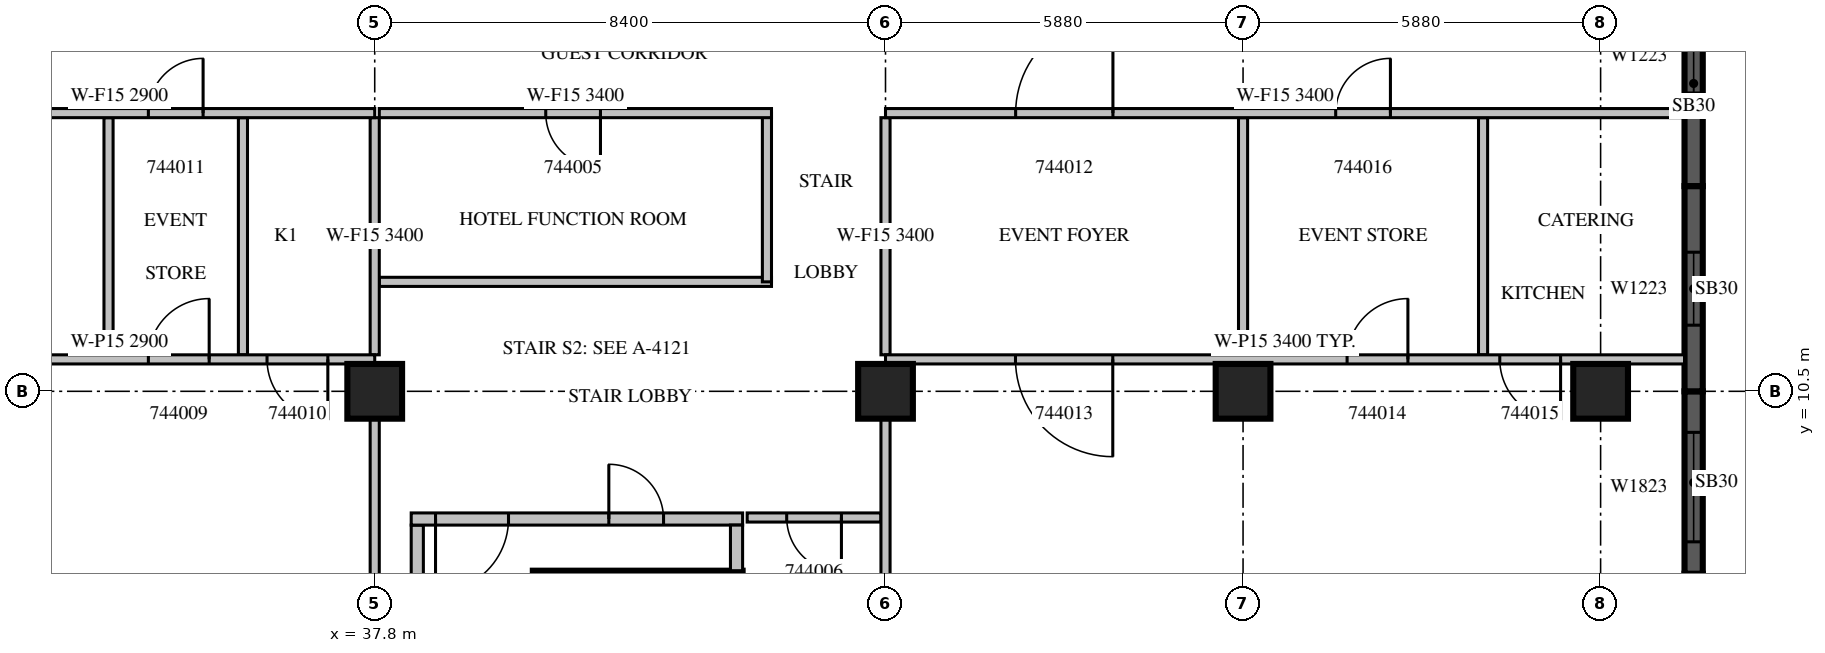
"""IFC4 building model, lengths in metres.
Left out: names, types, materials, properties, quantities, classifications, styles, units other than length and angle.
Written with IfcOpenShell. Run it as: python <this file> out.ifc"""

import sys

from ifc_helpers import new_model, si_unit, direction, frame, frame_2d, origin, origin_2d, place, context, subcontext, project, spatial, rectangle, extrude, source, transform, mapped, element, fill, save


model = new_model("IFC4")
c1 = context("Model", 3, precision=1e-05, world=origin(), true_north=direction((0.0, 1.0)))
c2 = subcontext(c1, "Body", "Model", "MODEL_VIEW")
j1 = project(units=[si_unit("LENGTHUNIT", "METRE"), si_unit("PLANEANGLEUNIT", "RADIAN")], contexts=[c1])
p1 = place(None, origin())
s1 = spatial("IfcSite", under=j1, at=p1, CompositionType="ELEMENT")
p2 = place(p1, origin())
s2 = spatial("IfcBuilding", under=s1, at=p2, CompositionType="ELEMENT")
p3 = place(p2, frame((0.0, 0.0, 200.6)))
s3 = spatial("IfcBuildingStorey", under=s2, at=p3, CompositionType="ELEMENT", Elevation=200.6)
m1 = source(origin(), c2, "Body", "SweptSolid", [
    extrude(rectangle(XDim=0.9, YDim=0.9, at=origin_2d()), origin(), (0.0, 0.0, 1.0), 3.8),
])
for number, where, z_axis, x_axis in (
    (1, (37.8, 10.5, 0.0), (0.0, 0.0, 1.0), (1.0, 0.0, 0.0)),
    (2, (46.2, 10.5, 0.0), (0.0, 0.0, 1.0), (1.0, 0.0, 0.0)),
    (3, (52.08, 10.5, 0.0), (0.0, 0.0, 1.0), (1.0, 0.0, 0.0)),
    (4, (57.96, 10.5, 0.0), (0.0, 0.0, 1.0), (1.0, 0.0, 0.0)),
):
    element("IfcColumn", number, at=place(p3, frame(where, z_axis=z_axis, x_axis=x_axis)), inside=s3, PredefinedType="COLUMN", context=c2, shape_type="MappedRepresentation", body=[
        mapped(m1, transform((0.0, 0.0, 0.0), scale=1.0)),
    ])
p4 = place(p3, frame((59.49, 7.5, 0.0), z_axis=(0.0, 0.0, 1.0), x_axis=(0.0, 1.0, 0.0)))
e5 = element("IfcWall", 5, at=p4, inside=s3, PredefinedType="SOLIDWALL", context=c2, shape_type="SweptSolid", body=[
    extrude(rectangle(XDim=3.0, YDim=0.3, at=frame_2d((1.5, 0.0))), origin(), (0.0, 0.0, 1.0), 3.4),
])
m2 = source(origin(), c2, "Body", "SweptSolid", [
    extrude(rectangle(XDim=1.8, YDim=2.3, at=frame_2d((0.9, 1.15))), frame((0.0, 0.16, 0.0), z_axis=(0.0, -1.0, 0.0), x_axis=(1.0, 0.0, 0.0)), (0.0, 0.0, 1.0), 0.32),
])
p5 = place(p4, frame((0.525, 0.0, 0.6)))
e6 = element("IfcOpeningElement", 6, at=p5, cuts=e5, PredefinedType="OPENING", context=c2, shape_type="MappedRepresentation", body=[
    mapped(m2, transform((0.0, 0.0, 0.0), scale=1.0)),
])
p6 = place(p3, frame((59.49, 10.5, 0.0), z_axis=(0.0, 0.0, 1.0), x_axis=(0.0, 1.0, 0.0)))
e7 = element("IfcWall", 7, at=p6, inside=s3, PredefinedType="SOLIDWALL", context=c2, shape_type="SweptSolid", body=[
    extrude(rectangle(XDim=3.375, YDim=0.3, at=frame_2d((1.688, 0.0))), origin(), (0.0, 0.0, 1.0), 3.4),
])
m3 = source(origin(), c2, "Body", "SweptSolid", [
    extrude(rectangle(XDim=1.2, YDim=2.3, at=frame_2d((0.6, 1.15))), frame((0.0, 0.16, 0.0), z_axis=(0.0, -1.0, 0.0), x_axis=(1.0, 0.0, 0.0)), (0.0, 0.0, 1.0), 0.32),
])
p7 = place(p6, frame((1.087, 0.0, 0.6)))
e8 = element("IfcOpeningElement", 8, at=p7, cuts=e7, PredefinedType="OPENING", context=c2, shape_type="MappedRepresentation", body=[
    mapped(m3, transform((0.0, 0.0, 0.0), scale=1.0)),
])
m4 = source(origin(), c2, "Body", "SweptSolid", [
    extrude(rectangle(XDim=3.375, YDim=0.3, at=frame_2d((1.688, 0.0))), origin(), (0.0, 0.0, 1.0), 3.4),
])
p8 = place(p3, frame((59.49, 13.875, 0.0), z_axis=(0.0, 0.0, 1.0), x_axis=(0.0, 1.0, 0.0)))
e9 = element("IfcWall", 9, at=p8, inside=s3, PredefinedType="SOLIDWALL", context=c2, shape_type="MappedRepresentation", body=[
    mapped(m4, transform((0.0, 0.0, 0.0), scale=1.0)),
])
p9 = place(p8, frame((1.531, 0.0, 0.6)))
e10 = element("IfcOpeningElement", 10, at=p9, cuts=e9, PredefinedType="OPENING", context=c2, shape_type="MappedRepresentation", body=[
    mapped(m3, transform((0.0, 0.0, 0.0), scale=1.0)),
])
m5 = source(origin(), c2, "Body", "SweptSolid", [
    extrude(rectangle(XDim=3.45, YDim=0.25, at=frame_2d((1.725, 0.0))), origin(), (0.0, 0.0, 1.0), 3.4),
])
p10 = place(p3, frame((40.4, 7.425, 0.0), z_axis=(0.0, 0.0, 1.0), x_axis=(1.0, 0.0, 0.0)))
e11 = element("IfcWall", 11, at=p10, inside=s3, PredefinedType="SOLIDWALL", context=c2, shape_type="MappedRepresentation", body=[
    mapped(m5, transform((0.0, 0.0, 0.0), scale=1.0)),
])
m6 = source(origin(), c2, "Body", "SweptSolid", [
    extrude(rectangle(XDim=8.0, YDim=0.2, at=frame_2d((4.0, 0.0))), origin(), (0.0, 0.0, 1.0), 3.4),
])
p11 = place(p3, frame((38.5, 0.3, 0.0), z_axis=(0.0, 0.0, 1.0), x_axis=(0.0, 1.0, 0.0)))
e12 = element("IfcWall", 12, at=p11, inside=s3, PredefinedType="PARTITIONING", context=c2, shape_type="MappedRepresentation", body=[
    mapped(m6, transform((0.0, 0.0, 0.0), scale=1.0)),
])
m7 = source(origin(), c2, "Body", "SweptSolid", [
    extrude(rectangle(XDim=5.45, YDim=0.2, at=frame_2d((2.725, 0.0))), origin(), (0.0, 0.0, 1.0), 3.4),
])
p12 = place(p3, frame((38.4, 8.4, 0.0), z_axis=(0.0, 0.0, 1.0), x_axis=(1.0, 0.0, 0.0)))
e13 = element("IfcWall", 13, at=p12, inside=s3, PredefinedType="PARTITIONING", context=c2, shape_type="MappedRepresentation", body=[
    mapped(m7, transform((0.0, 0.0, 0.0), scale=1.0)),
])
m8 = source(origin(), c2, "Body", "SweptSolid", [
    extrude(rectangle(XDim=1.2, YDim=2.1, at=frame_2d((0.6, 1.05))), frame((0.0, 0.11, 0.0), z_axis=(0.0, -1.0, 0.0), x_axis=(1.0, 0.0, 0.0)), (0.0, 0.0, 1.0), 0.22),
])
p13 = place(p12, frame((0.4, 0.0, 0.0)))
e14 = element("IfcOpeningElement", 14, at=p13, cuts=e13, PredefinedType="OPENING", context=c2, shape_type="MappedRepresentation", body=[
    mapped(m8, transform((0.0, 0.0, 0.0), scale=1.0)),
])
m9 = source(origin(), c2, "Body", "SweptSolid", [
    extrude(rectangle(XDim=0.9, YDim=2.1, at=frame_2d((0.45, 1.05))), frame((0.0, 0.11, 0.0), z_axis=(0.0, -1.0, 0.0), x_axis=(1.0, 0.0, 0.0)), (0.0, 0.0, 1.0), 0.22),
])
p14 = place(p12, frame((3.25, 0.0, 0.0)))
e15 = element("IfcOpeningElement", 15, at=p14, cuts=e13, PredefinedType="OPENING", context=c2, shape_type="MappedRepresentation", body=[
    mapped(m9, transform((0.0, 0.0, 0.0), scale=1.0)),
])
m10 = source(origin(), c2, "Body", "SweptSolid", [
    extrude(rectangle(XDim=0.75, YDim=0.2, at=frame_2d((0.375, 0.0))), origin(), (0.0, 0.0, 1.0), 3.4),
])
p15 = place(p3, frame((43.75, 7.55, 0.0), z_axis=(0.0, 0.0, 1.0), x_axis=(0.0, 1.0, 0.0)))
e16 = element("IfcWall", 16, at=p15, inside=s3, PredefinedType="PARTITIONING", context=c2, shape_type="MappedRepresentation", body=[
    mapped(m10, transform((0.0, 0.0, 0.0), scale=1.0)),
])
m11 = source(origin(), c2, "Body", "SweptSolid", [
    extrude(rectangle(XDim=6.45, YDim=0.15, at=frame_2d((3.225, 0.0))), origin(), (0.0, 0.0, 1.0), 3.4),
])
p16 = place(p3, frame((37.875, 12.3, 0.0), z_axis=(0.0, 0.0, 1.0), x_axis=(1.0, 0.0, 0.0)))
e17 = element("IfcWall", 17, at=p16, inside=s3, PredefinedType="PARTITIONING", context=c2, shape_type="MappedRepresentation", body=[
    mapped(m11, transform((0.0, 0.0, 0.0), scale=1.0)),
])
p17 = place(p3, frame((44.25, 12.3, 0.0), z_axis=(0.0, 0.0, 1.0), x_axis=(0.0, 1.0, 0.0)))
e18 = element("IfcWall", 18, at=p17, inside=s3, PredefinedType="PARTITIONING", context=c2, shape_type="SweptSolid", body=[
    extrude(rectangle(XDim=2.775, YDim=0.15, at=frame_2d((1.387, 0.0))), origin(), (0.0, 0.0, 1.0), 3.4),
])
p18 = place(p3, frame((44.325, 15.075, 0.0), z_axis=(0.0, 0.0, 1.0), x_axis=(-1.0, 0.0, 0.0)))
e19 = element("IfcWall", 19, at=p18, inside=s3, PredefinedType="PARTITIONING", context=c2, shape_type="MappedRepresentation", body=[
    mapped(m11, transform((0.0, 0.0, 0.0), scale=1.0)),
])
m12 = source(origin(), c2, "Body", "SweptSolid", [
    extrude(rectangle(XDim=0.9, YDim=2.1, at=frame_2d((0.45, 1.05))), frame((0.0, 0.085, 0.0), z_axis=(0.0, -1.0, 0.0), x_axis=(1.0, 0.0, 0.0)), (0.0, 0.0, 1.0), 0.17),
])
p19 = place(p18, frame((2.812, 0.0, 0.0)))
e20 = element("IfcOpeningElement", 20, at=p19, cuts=e19, PredefinedType="OPENING", context=c2, shape_type="MappedRepresentation", body=[
    mapped(m12, transform((0.0, 0.0, 0.0), scale=1.0)),
])
m13 = source(origin(), c2, "Body", "SweptSolid", [
    extrude(rectangle(XDim=2.2, YDim=0.15, at=frame_2d((1.1, 0.0))), origin(), (0.0, 0.0, 1.0), 3.4),
])
p20 = place(p3, frame((46.125, 8.425, 0.0), z_axis=(0.0, 0.0, 1.0), x_axis=(-1.0, 0.0, 0.0)))
e21 = element("IfcWall", 21, at=p20, inside=s3, PredefinedType="PARTITIONING", context=c2, shape_type="MappedRepresentation", body=[
    mapped(m13, transform((0.0, 0.0, 0.0), scale=1.0)),
])
p21 = place(p20, frame((0.65, 0.0, 0.0)))
e22 = element("IfcOpeningElement", 22, at=p21, cuts=e21, PredefinedType="OPENING", context=c2, shape_type="MappedRepresentation", body=[
    mapped(m12, transform((0.0, 0.0, 0.0), scale=1.0)),
])
m14 = source(origin(), c2, "Body", "SweptSolid", [
    extrude(rectangle(XDim=3.9, YDim=0.15, at=frame_2d((1.95, 0.0))), origin(), (0.0, 0.0, 1.0), 3.4),
])
for number, where, z_axis, x_axis in (
    (23, (33.422, 11.1, 0.0), (0.0, 0.0, 1.0), (0.0, 1.0, 0.0)),
    (24, (35.633, 11.1, 0.0), (0.0, 0.0, 1.0), (0.0, 1.0, 0.0)),
):
    element("IfcWall", number, at=place(p3, frame(where, z_axis=z_axis, x_axis=x_axis)), inside=s3, PredefinedType="PARTITIONING", context=c2, shape_type="MappedRepresentation", body=[
        mapped(m14, transform((0.0, 0.0, 0.0), scale=1.0)),
    ])
m15 = source(origin(), c2, "Body", "SweptSolid", [
    extrude(rectangle(XDim=9.152, YDim=0.15, at=frame_2d((4.576, 0.0))), origin(), (0.0, 0.0, 1.0), 3.4),
])
p22 = place(p3, frame((37.8, 0.899, 0.0), z_axis=(0.0, 0.0, 1.0), x_axis=(0.0, 1.0, 0.0)))
e25 = element("IfcWall", 25, at=p22, inside=s3, PredefinedType="PARTITIONING", context=c2, shape_type="MappedRepresentation", body=[
    mapped(m15, transform((0.0, 0.0, 0.0), scale=1.0)),
])
p23 = place(p3, frame((37.8, 11.1, 0.0), z_axis=(0.0, 0.0, 1.0), x_axis=(0.0, 1.0, 0.0)))
e26 = element("IfcWall", 26, at=p23, inside=s3, PredefinedType="PARTITIONING", context=c2, shape_type="MappedRepresentation", body=[
    mapped(m14, transform((0.0, 0.0, 0.0), scale=1.0)),
])
m16 = source(origin(), c2, "Body", "SweptSolid", [
    extrude(rectangle(XDim=8.4, YDim=0.15, at=frame_2d((4.2, 0.0))), origin(), (0.0, 0.0, 1.0), 2.9),
])
p24 = place(p3, frame((37.8, 11.025, 0.0), z_axis=(0.0, 0.0, 1.0), x_axis=(-1.0, 0.0, 0.0)))
e27 = element("IfcWall", 27, at=p24, inside=s3, PredefinedType="PARTITIONING", context=c2, shape_type="MappedRepresentation", body=[
    mapped(m16, transform((0.0, 0.0, 0.0), scale=1.0)),
])
m17 = source(origin(), c2, "Body", "SweptSolid", [
    extrude(rectangle(XDim=1.6, YDim=2.1, at=frame_2d((0.8, 1.05))), frame((0.0, 0.085, 0.0), z_axis=(0.0, -1.0, 0.0), x_axis=(1.0, 0.0, 0.0)), (0.0, 0.0, 1.0), 0.17),
])
p25 = place(p24, frame((5.351, 0.0, 0.0)))
e28 = element("IfcOpeningElement", 28, at=p25, cuts=e27, PredefinedType="OPENING", context=c2, shape_type="MappedRepresentation", body=[
    mapped(m17, transform((0.0, 0.0, 0.0), scale=1.0)),
])
m18 = source(origin(), c2, "Body", "SweptSolid", [
    extrude(rectangle(XDim=1.0, YDim=2.1, at=frame_2d((0.5, 1.05))), frame((0.0, 0.085, 0.0), z_axis=(0.0, -1.0, 0.0), x_axis=(1.0, 0.0, 0.0)), (0.0, 0.0, 1.0), 0.17),
])
p26 = place(p24, frame((2.722, 0.0, 0.0)))
e29 = element("IfcOpeningElement", 29, at=p26, cuts=e27, PredefinedType="OPENING", context=c2, shape_type="MappedRepresentation", body=[
    mapped(m18, transform((0.0, 0.0, 0.0), scale=1.0)),
])
p27 = place(p24, frame((0.771, 0.0, 0.0)))
e30 = element("IfcOpeningElement", 30, at=p27, cuts=e27, PredefinedType="OPENING", context=c2, shape_type="MappedRepresentation", body=[
    mapped(m18, transform((0.0, 0.0, 0.0), scale=1.0)),
])
for number, where, z_axis, x_axis in (
    (31, (52.08, 11.1, 0.0), (0.0, 0.0, 1.0), (0.0, 1.0, 0.0)),
    (32, (56.027, 11.1, 0.0), (0.0, 0.0, 1.0), (0.0, 1.0, 0.0)),
):
    element("IfcWall", number, at=place(p3, frame(where, z_axis=z_axis, x_axis=x_axis)), inside=s3, PredefinedType="PARTITIONING", context=c2, shape_type="MappedRepresentation", body=[
        mapped(m14, transform((0.0, 0.0, 0.0), scale=1.0)),
    ])
p28 = place(p3, frame((46.2, 0.899, 0.0), z_axis=(0.0, 0.0, 1.0), x_axis=(0.0, 1.0, 0.0)))
e33 = element("IfcWall", 33, at=p28, inside=s3, PredefinedType="PARTITIONING", context=c2, shape_type="MappedRepresentation", body=[
    mapped(m15, transform((0.0, 0.0, 0.0), scale=1.0)),
])
p29 = place(p3, frame((46.2, 11.1, 0.0), z_axis=(0.0, 0.0, 1.0), x_axis=(0.0, 1.0, 0.0)))
e34 = element("IfcWall", 34, at=p29, inside=s3, PredefinedType="PARTITIONING", context=c2, shape_type="MappedRepresentation", body=[
    mapped(m14, transform((0.0, 0.0, 0.0), scale=1.0)),
])
m19 = source(origin(), c2, "Body", "SweptSolid", [
    extrude(rectangle(XDim=13.14, YDim=0.15, at=frame_2d((6.57, 0.0))), origin(), (0.0, 0.0, 1.0), 3.4),
])
p30 = place(p3, frame((59.34, 11.025, 0.0), z_axis=(0.0, 0.0, 1.0), x_axis=(-1.0, 0.0, 0.0)))
e35 = element("IfcWall", 35, at=p30, inside=s3, PredefinedType="PARTITIONING", context=c2, shape_type="MappedRepresentation", body=[
    mapped(m19, transform((0.0, 0.0, 0.0), scale=1.0)),
])
p31 = place(p30, frame((9.402, 0.0, 0.0)))
e36 = element("IfcOpeningElement", 36, at=p31, cuts=e35, PredefinedType="OPENING", context=c2, shape_type="MappedRepresentation", body=[
    mapped(m17, transform((0.0, 0.0, 0.0), scale=1.0)),
])
p32 = place(p30, frame((4.549, 0.0, 0.0)))
e37 = element("IfcOpeningElement", 37, at=p32, cuts=e35, PredefinedType="OPENING", context=c2, shape_type="MappedRepresentation", body=[
    mapped(m18, transform((0.0, 0.0, 0.0), scale=1.0)),
])
p33 = place(p30, frame((2.038, 0.0, 0.0)))
e38 = element("IfcOpeningElement", 38, at=p33, cuts=e35, PredefinedType="OPENING", context=c2, shape_type="MappedRepresentation", body=[
    mapped(m18, transform((0.0, 0.0, 0.0), scale=1.0)),
])
p34 = place(p3, frame((37.8, 15.075, 0.0), z_axis=(0.0, 0.0, 1.0), x_axis=(-1.0, 0.0, 0.0)))
e39 = element("IfcWall", 39, at=p34, inside=s3, PredefinedType="PARTITIONING", context=c2, shape_type="MappedRepresentation", body=[
    mapped(m16, transform((0.0, 0.0, 0.0), scale=1.0)),
])
p35 = place(p34, frame((5.589, 0.0, 0.0)))
e40 = element("IfcOpeningElement", 40, at=p35, cuts=e39, PredefinedType="OPENING", context=c2, shape_type="MappedRepresentation", body=[
    mapped(m17, transform((0.0, 0.0, 0.0), scale=1.0)),
])
p36 = place(p34, frame((2.822, 0.0, 0.0)))
e41 = element("IfcOpeningElement", 41, at=p36, cuts=e39, PredefinedType="OPENING", context=c2, shape_type="MappedRepresentation", body=[
    mapped(m12, transform((0.0, 0.0, 0.0), scale=1.0)),
])
p37 = place(p3, frame((59.34, 15.075, 0.0), z_axis=(0.0, 0.0, 1.0), x_axis=(-1.0, 0.0, 0.0)))
e42 = element("IfcWall", 42, at=p37, inside=s3, PredefinedType="PARTITIONING", context=c2, shape_type="MappedRepresentation", body=[
    mapped(m19, transform((0.0, 0.0, 0.0), scale=1.0)),
])
p38 = place(p37, frame((9.4, 0.0, 0.0)))
e43 = element("IfcOpeningElement", 43, at=p38, cuts=e42, PredefinedType="OPENING", context=c2, shape_type="MappedRepresentation", body=[
    mapped(m17, transform((0.0, 0.0, 0.0), scale=1.0)),
])
p39 = place(p37, frame((4.837, 0.0, 0.0)))
e44 = element("IfcOpeningElement", 44, at=p39, cuts=e42, PredefinedType="OPENING", context=c2, shape_type="MappedRepresentation", body=[
    mapped(m12, transform((0.0, 0.0, 0.0), scale=1.0)),
])
m20 = source(origin(), c2, "Body", "SweptSolid", [
    extrude(rectangle(XDim=1.8, YDim=2.3, at=frame_2d((0.9, 1.15))), frame((0.0, 0.03, 0.0), z_axis=(0.0, -1.0, 0.0), x_axis=(1.0, 0.0, 0.0)), (0.0, 0.0, 1.0), 0.06),
])
p40 = place(p5, origin())
e45 = element("IfcWindow", 45, at=p40, inside=s3, PartitioningType="SINGLE_PANEL", PredefinedType="WINDOW", context=c2, shape_type="MappedRepresentation", body=[
    mapped(m20, transform((0.0, 0.0, 0.0), scale=1.0)),
])
fill(e6, e45)
m21 = source(origin(), c2, "Body", "SweptSolid", [
    extrude(rectangle(XDim=1.2, YDim=2.3, at=frame_2d((0.6, 1.15))), frame((0.0, 0.03, 0.0), z_axis=(0.0, -1.0, 0.0), x_axis=(1.0, 0.0, 0.0)), (0.0, 0.0, 1.0), 0.06),
])
p41 = place(p7, origin())
e46 = element("IfcWindow", 46, at=p41, inside=s3, PartitioningType="SINGLE_PANEL", PredefinedType="WINDOW", context=c2, shape_type="MappedRepresentation", body=[
    mapped(m21, transform((0.0, 0.0, 0.0), scale=1.0)),
])
fill(e8, e46)
p42 = place(p9, origin())
e47 = element("IfcWindow", 47, at=p42, inside=s3, PartitioningType="SINGLE_PANEL", PredefinedType="WINDOW", context=c2, shape_type="MappedRepresentation", body=[
    mapped(m21, transform((0.0, 0.0, 0.0), scale=1.0)),
])
fill(e10, e47)
m22 = source(origin(), c2, "Body", "SweptSolid", [
    extrude(rectangle(XDim=1.2, YDim=2.1, at=frame_2d((0.6, 1.05))), frame((0.0, 0.025, 0.0), z_axis=(0.0, -1.0, 0.0), x_axis=(1.0, 0.0, 0.0)), (0.0, 0.0, 1.0), 0.05),
])
p43 = place(p13, origin())
e48 = element("IfcDoor", 48, at=p43, inside=s3, OperationType="SINGLE_SWING_RIGHT", PredefinedType="DOOR", context=c2, shape_type="MappedRepresentation", body=[
    mapped(m22, transform((0.0, 0.0, 0.0), scale=1.0)),
])
fill(e14, e48)
m23 = source(origin(), c2, "Body", "SweptSolid", [
    extrude(rectangle(XDim=0.9, YDim=2.1, at=frame_2d((0.45, 1.05))), frame((0.0, 0.025, 0.0), z_axis=(0.0, -1.0, 0.0), x_axis=(1.0, 0.0, 0.0)), (0.0, 0.0, 1.0), 0.05),
])
p44 = place(p14, origin())
e49 = element("IfcDoor", 49, at=p44, inside=s3, OperationType="SINGLE_SWING_LEFT", PredefinedType="DOOR", context=c2, shape_type="MappedRepresentation", body=[
    mapped(m23, transform((0.0, 0.0, 0.0), scale=1.0)),
])
fill(e15, e49)
p45 = place(p19, origin())
e50 = element("IfcDoor", 50, at=p45, inside=s3, OperationType="SINGLE_SWING_LEFT", PredefinedType="DOOR", context=c2, shape_type="MappedRepresentation", body=[
    mapped(m23, transform((0.0, 0.0, 0.0), scale=1.0)),
])
fill(e20, e50)
p46 = place(p21, origin())
e51 = element("IfcDoor", 51, at=p46, inside=s3, OperationType="SINGLE_SWING_LEFT", PredefinedType="DOOR", context=c2, shape_type="MappedRepresentation", body=[
    mapped(m23, transform((0.0, 0.0, 0.0), scale=1.0)),
])
fill(e22, e51)
m24 = source(origin(), c2, "Body", "SweptSolid", [
    extrude(rectangle(XDim=1.0, YDim=2.1, at=frame_2d((0.5, 1.05))), frame((0.0, 0.025, 0.0), z_axis=(0.0, -1.0, 0.0), x_axis=(1.0, 0.0, 0.0)), (0.0, 0.0, 1.0), 0.05),
])
p47 = place(p26, origin())
e52 = element("IfcDoor", 52, at=p47, inside=s3, OperationType="SINGLE_SWING_RIGHT", PredefinedType="DOOR", context=c2, shape_type="MappedRepresentation", body=[
    mapped(m24, transform((0.0, 0.0, 0.0), scale=1.0)),
])
fill(e29, e52)
p48 = place(p27, origin())
e53 = element("IfcDoor", 53, at=p48, inside=s3, OperationType="SINGLE_SWING_LEFT", PredefinedType="DOOR", context=c2, shape_type="MappedRepresentation", body=[
    mapped(m24, transform((0.0, 0.0, 0.0), scale=1.0)),
])
fill(e30, e53)
p49 = place(p36, origin())
e54 = element("IfcDoor", 54, at=p49, inside=s3, OperationType="SINGLE_SWING_RIGHT", PredefinedType="DOOR", context=c2, shape_type="MappedRepresentation", body=[
    mapped(m23, transform((0.0, 0.0, 0.0), scale=1.0)),
])
fill(e41, e54)
m25 = source(origin(), c2, "Body", "SweptSolid", [
    extrude(rectangle(XDim=1.6, YDim=2.1, at=frame_2d((0.8, 1.05))), frame((0.0, 0.025, 0.0), z_axis=(0.0, -1.0, 0.0), x_axis=(1.0, 0.0, 0.0)), (0.0, 0.0, 1.0), 0.05),
])
p50 = place(p38, origin())
e55 = element("IfcDoor", 55, at=p50, inside=s3, OperationType="SINGLE_SWING_RIGHT", PredefinedType="DOOR", context=c2, shape_type="MappedRepresentation", body=[
    mapped(m25, transform((0.0, 0.0, 0.0), scale=1.0)),
])
fill(e43, e55)
p51 = place(p31, origin())
e56 = element("IfcDoor", 56, at=p51, inside=s3, OperationType="SINGLE_SWING_LEFT", PredefinedType="DOOR", context=c2, shape_type="MappedRepresentation", body=[
    mapped(m25, transform((0.0, 0.0, 0.0), scale=1.0)),
])
fill(e36, e56)
p52 = place(p32, origin())
e57 = element("IfcDoor", 57, at=p52, inside=s3, OperationType="SINGLE_SWING_RIGHT", PredefinedType="DOOR", context=c2, shape_type="MappedRepresentation", body=[
    mapped(m24, transform((0.0, 0.0, 0.0), scale=1.0)),
])
fill(e37, e57)
p53 = place(p33, origin())
e58 = element("IfcDoor", 58, at=p53, inside=s3, OperationType="SINGLE_SWING_LEFT", PredefinedType="DOOR", context=c2, shape_type="MappedRepresentation", body=[
    mapped(m24, transform((0.0, 0.0, 0.0), scale=1.0)),
])
fill(e38, e58)
p54 = place(p39, origin())
e59 = element("IfcDoor", 59, at=p54, inside=s3, OperationType="SINGLE_SWING_RIGHT", PredefinedType="DOOR", context=c2, shape_type="MappedRepresentation", body=[
    mapped(m23, transform((0.0, 0.0, 0.0), scale=1.0)),
])
fill(e44, e59)
save(model, sys.argv[1])
